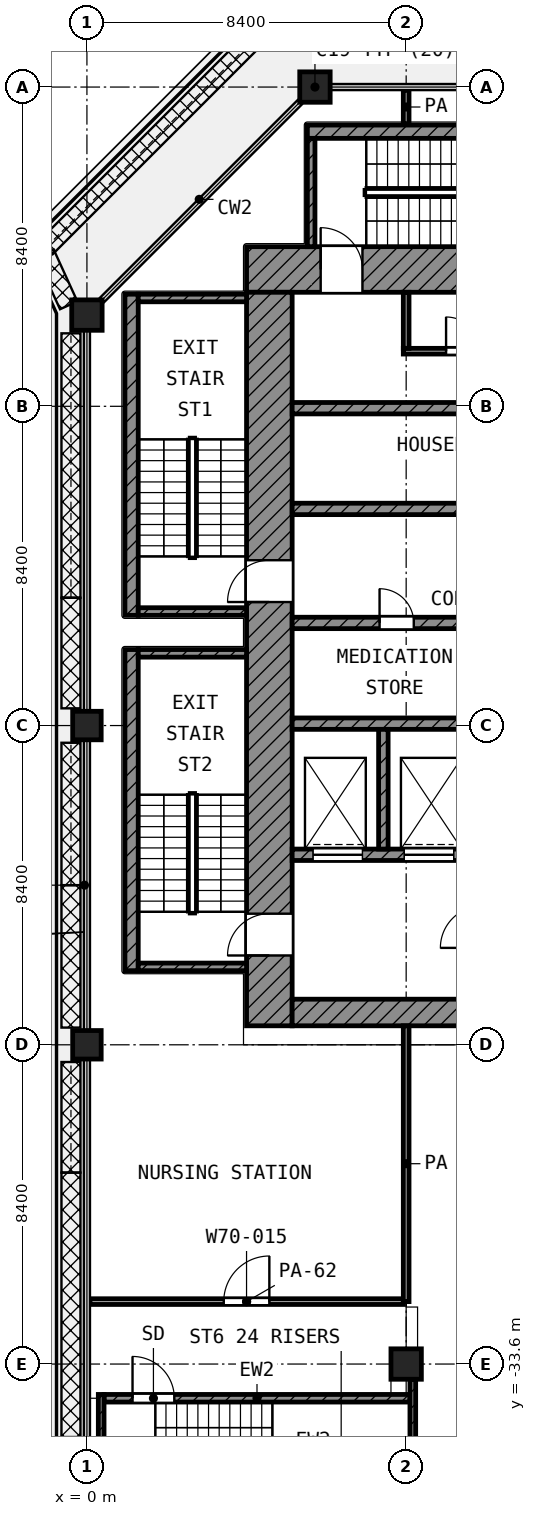
"""IFC4 building model, lengths in metres.
Left out: names, types, materials, properties, quantities, classifications, styles, units other than length and angle.
Written with IfcOpenShell. Run it as: python <this file> out.ifc"""

import sys

from ifc_helpers import new_model, si_unit, direction, frame, frame_2d, origin, origin_2d, place, context, subcontext, project, spatial, rectangle, extrude, element, fill, save


model = new_model("IFC4")
c1 = context("Model", 3, precision=1e-05, world=origin(), true_north=direction((0.0, 1.0)))
c2 = subcontext(c1, "Body", "Model", "MODEL_VIEW")
j1 = project(units=[si_unit("LENGTHUNIT", "METRE"), si_unit("PLANEANGLEUNIT", "RADIAN")], contexts=[c1])
p1 = place(None, origin())
s1 = spatial("IfcSite", under=j1, at=p1, CompositionType="ELEMENT")
p2 = place(p1, origin())
s2 = spatial("IfcBuilding", under=s1, at=p2, CompositionType="ELEMENT")
p3 = place(p2, frame((0.0, 0.0, 323.8)))
s3 = spatial("IfcBuildingStorey", under=s2, at=p3, CompositionType="ELEMENT", Elevation=323.8)
for number, where, z_axis, x_axis in (
    (1, (6.0, 0.0, 0.0), (0.0, 0.0, 1.0), (1.0, 0.0, 0.0)),
    (2, (0.0, -6.0, 0.0), (0.0, 0.0, 1.0), (1.0, 0.0, 0.0)),
):
    element("IfcColumn", number, at=place(p3, frame(where, z_axis=z_axis, x_axis=x_axis)), inside=s3, PredefinedType="COLUMN", context=c2, shape_type="SweptSolid", body=[
        extrude(rectangle(XDim=0.8, YDim=0.8, at=origin_2d()), origin(), (0.0, 0.0, 1.0), 4.2),
    ])
for number, where, z_axis, x_axis in (
    (3, (0.0, -16.8, 0.0), (0.0, 0.0, 1.0), (1.0, 0.0, 0.0)),
    (4, (0.0, -25.2, 0.0), (0.0, 0.0, 1.0), (1.0, 0.0, 0.0)),
):
    element("IfcColumn", number, at=place(p3, frame(where, z_axis=z_axis, x_axis=x_axis)), inside=s3, PredefinedType="COLUMN", context=c2, shape_type="SweptSolid", body=[
        extrude(rectangle(XDim=0.75, YDim=0.75, at=origin_2d()), origin(), (0.0, 0.0, 1.0), 4.2),
    ])
p4 = place(p3, frame((8.4, -33.6, 0.0), z_axis=(0.0, 0.0, 1.0), x_axis=(1.0, 0.0, 0.0)))
e5 = element("IfcColumn", 5, at=p4, inside=s3, PredefinedType="COLUMN", context=c2, shape_type="SweptSolid", body=[
    extrude(rectangle(XDim=0.8, YDim=0.8, at=origin_2d()), origin(), (0.0, 0.0, 1.0), 4.2),
])
p5 = place(p3, frame((4.2, -4.8, 0.0), z_axis=(0.0, 0.0, 1.0), x_axis=(1.0, 0.0, 0.0)))
e6 = element("IfcWall", 6, at=p5, inside=s3, PredefinedType="SHEAR", context=c2, shape_type="SweptSolid", body=[
    extrude(rectangle(XDim=20.5, YDim=1.2, at=frame_2d((10.25, 0.0))), origin(), (0.0, 0.0, 1.0), 3.6),
])
p6 = place(p5, frame((1.95, 0.0, 0.0)))
e7 = element("IfcOpeningElement", 7, at=p6, cuts=e6, PredefinedType="OPENING", context=c2, shape_type="SweptSolid", body=[
    extrude(rectangle(XDim=1.1, YDim=2.1, at=frame_2d((0.55, 1.05))), frame((0.0, 0.61, 0.0), z_axis=(0.0, -1.0, 0.0), x_axis=(1.0, 0.0, 0.0)), (0.0, 0.0, 1.0), 1.22),
])
p7 = place(p5, frame((17.95, 0.0, 0.0)))
e8 = element("IfcOpeningElement", 8, at=p7, cuts=e6, PredefinedType="OPENING", context=c2, shape_type="SweptSolid", body=[
    extrude(rectangle(XDim=1.1, YDim=2.1, at=frame_2d((0.55, 1.05))), frame((0.0, 0.61, 0.0), z_axis=(0.0, -1.0, 0.0), x_axis=(1.0, 0.0, 0.0)), (0.0, 0.0, 1.0), 1.22),
])
p8 = place(p3, frame((4.8, -24.7, 0.0), z_axis=(0.0, 0.0, 1.0), x_axis=(0.0, 1.0, 0.0)))
e9 = element("IfcWall", 9, at=p8, inside=s3, PredefinedType="SHEAR", context=c2, shape_type="SweptSolid", body=[
    extrude(rectangle(XDim=19.3, YDim=1.2, at=frame_2d((9.65, 0.0))), origin(), (0.0, 0.0, 1.0), 3.6),
])
p9 = place(p8, frame((11.15, 0.0, 0.0)))
e10 = element("IfcOpeningElement", 10, at=p9, cuts=e9, PredefinedType="OPENING", context=c2, shape_type="SweptSolid", body=[
    extrude(rectangle(XDim=1.1, YDim=2.1, at=frame_2d((0.55, 1.05))), frame((0.0, 0.61, 0.0), z_axis=(0.0, -1.0, 0.0), x_axis=(1.0, 0.0, 0.0)), (0.0, 0.0, 1.0), 1.22),
])
p10 = place(p8, frame((1.85, 0.0, 0.0)))
e11 = element("IfcOpeningElement", 11, at=p10, cuts=e9, PredefinedType="OPENING", context=c2, shape_type="SweptSolid", body=[
    extrude(rectangle(XDim=1.1, YDim=2.1, at=frame_2d((0.55, 1.05))), frame((0.0, 0.61, 0.0), z_axis=(0.0, -1.0, 0.0), x_axis=(1.0, 0.0, 0.0)), (0.0, 0.0, 1.0), 1.22),
])
p11 = place(p3, frame((5.4, -24.35, 0.0), z_axis=(0.0, 0.0, 1.0), x_axis=(1.0, 0.0, 0.0)))
e12 = element("IfcWall", 12, at=p11, inside=s3, PredefinedType="SHEAR", context=c2, shape_type="SweptSolid", body=[
    extrude(rectangle(XDim=18.6, YDim=0.7, at=frame_2d((9.3, 0.0))), origin(), (0.0, 0.0, 1.0), 3.6),
])
p12 = place(p11, frame((6.3, 0.0, 0.0)))
e13 = element("IfcOpeningElement", 13, at=p12, cuts=e12, PredefinedType="OPENING", context=c2, shape_type="SweptSolid", body=[
    extrude(rectangle(XDim=1.8, YDim=2.1, at=frame_2d((0.9, 1.05))), frame((0.0, 0.36, 0.0), z_axis=(0.0, -1.0, 0.0), x_axis=(1.0, 0.0, 0.0)), (0.0, 0.0, 1.0), 0.72),
])
p13 = place(p3, frame((5.4, -8.45, 0.0), z_axis=(0.0, 0.0, 1.0), x_axis=(1.0, 0.0, 0.0)))
e14 = element("IfcWall", 14, at=p13, inside=s3, PredefinedType="SHEAR", context=c2, shape_type="SweptSolid", body=[
    extrude(rectangle(XDim=16.65, YDim=0.3, at=frame_2d((8.325, 0.0))), origin(), (0.0, 0.0, 1.0), 3.6),
])
p14 = place(p3, frame((5.4, -11.1, 0.0), z_axis=(0.0, 0.0, 1.0), x_axis=(1.0, 0.0, 0.0)))
e15 = element("IfcWall", 15, at=p14, inside=s3, PredefinedType="SHEAR", context=c2, shape_type="SweptSolid", body=[
    extrude(rectangle(XDim=16.65, YDim=0.3, at=frame_2d((8.325, 0.0))), origin(), (0.0, 0.0, 1.0), 3.6),
])
p15 = place(p14, frame((5.05, 0.0, 0.0)))
e16 = element("IfcOpeningElement", 16, at=p15, cuts=e15, PredefinedType="OPENING", context=c2, shape_type="SweptSolid", body=[
    extrude(rectangle(XDim=0.9, YDim=2.1, at=frame_2d((0.45, 1.05))), frame((0.0, 0.16, 0.0), z_axis=(0.0, -1.0, 0.0), x_axis=(1.0, 0.0, 0.0)), (0.0, 0.0, 1.0), 0.32),
])
p16 = place(p14, frame((13.3, 0.0, 0.0)))
e17 = element("IfcOpeningElement", 17, at=p16, cuts=e15, PredefinedType="OPENING", context=c2, shape_type="SweptSolid", body=[
    extrude(rectangle(XDim=0.9, YDim=2.1, at=frame_2d((0.45, 1.05))), frame((0.0, 0.16, 0.0), z_axis=(0.0, -1.0, 0.0), x_axis=(1.0, 0.0, 0.0)), (0.0, 0.0, 1.0), 0.32),
])
p17 = place(p3, frame((5.4, -14.1, 0.0), z_axis=(0.0, 0.0, 1.0), x_axis=(1.0, 0.0, 0.0)))
e18 = element("IfcWall", 18, at=p17, inside=s3, PredefinedType="SHEAR", context=c2, shape_type="SweptSolid", body=[
    extrude(rectangle(XDim=16.65, YDim=0.3, at=frame_2d((8.325, 0.0))), origin(), (0.0, 0.0, 1.0), 3.6),
])
p18 = place(p17, frame((6.325, 0.0, 0.0)))
e19 = element("IfcOpeningElement", 19, at=p18, cuts=e18, PredefinedType="OPENING", context=c2, shape_type="SweptSolid", body=[
    extrude(rectangle(XDim=1.1, YDim=2.1, at=frame_2d((0.55, 1.05))), frame((0.0, 0.16, 0.0), z_axis=(0.0, -1.0, 0.0), x_axis=(1.0, 0.0, 0.0)), (0.0, 0.0, 1.0), 0.32),
])
p19 = place(p17, frame((9.075, 0.0, 0.0)))
e20 = element("IfcOpeningElement", 20, at=p19, cuts=e18, PredefinedType="OPENING", context=c2, shape_type="SweptSolid", body=[
    extrude(rectangle(XDim=1.1, YDim=2.1, at=frame_2d((0.55, 1.05))), frame((0.0, 0.16, 0.0), z_axis=(0.0, -1.0, 0.0), x_axis=(1.0, 0.0, 0.0)), (0.0, 0.0, 1.0), 0.32),
])
p20 = place(p17, frame((11.825, 0.0, 0.0)))
e21 = element("IfcOpeningElement", 21, at=p20, cuts=e18, PredefinedType="OPENING", context=c2, shape_type="SweptSolid", body=[
    extrude(rectangle(XDim=1.1, YDim=2.1, at=frame_2d((0.55, 1.05))), frame((0.0, 0.16, 0.0), z_axis=(0.0, -1.0, 0.0), x_axis=(1.0, 0.0, 0.0)), (0.0, 0.0, 1.0), 0.32),
])
p21 = place(p17, frame((14.575, 0.0, 0.0)))
e22 = element("IfcOpeningElement", 22, at=p21, cuts=e18, PredefinedType="OPENING", context=c2, shape_type="SweptSolid", body=[
    extrude(rectangle(XDim=1.1, YDim=2.1, at=frame_2d((0.55, 1.05))), frame((0.0, 0.16, 0.0), z_axis=(0.0, -1.0, 0.0), x_axis=(1.0, 0.0, 0.0)), (0.0, 0.0, 1.0), 0.32),
])
p22 = place(p17, frame((2.3, 0.0, 0.0)))
e23 = element("IfcOpeningElement", 23, at=p22, cuts=e18, PredefinedType="OPENING", context=c2, shape_type="SweptSolid", body=[
    extrude(rectangle(XDim=0.9, YDim=2.1, at=frame_2d((0.45, 1.05))), frame((0.0, 0.16, 0.0), z_axis=(0.0, -1.0, 0.0), x_axis=(1.0, 0.0, 0.0)), (0.0, 0.0, 1.0), 0.32),
])
p23 = place(p3, frame((5.4, -16.75, 0.0), z_axis=(0.0, 0.0, 1.0), x_axis=(1.0, 0.0, 0.0)))
e24 = element("IfcWall", 24, at=p23, inside=s3, PredefinedType="SHEAR", context=c2, shape_type="SweptSolid", body=[
    extrude(rectangle(XDim=16.65, YDim=0.3, at=frame_2d((8.325, 0.0))), origin(), (0.0, 0.0, 1.0), 3.6),
])
p24 = place(p3, frame((5.4, -20.2, 0.0), z_axis=(0.0, 0.0, 1.0), x_axis=(1.0, 0.0, 0.0)))
e25 = element("IfcWall", 25, at=p24, inside=s3, PredefinedType="SHEAR", context=c2, shape_type="SweptSolid", body=[
    extrude(rectangle(XDim=14.65, YDim=0.3, at=frame_2d((7.325, 0.0))), origin(), (0.0, 0.0, 1.0), 3.6),
])
p25 = place(p24, frame((10.55, 0.0, 0.0)))
e26 = element("IfcOpeningElement", 26, at=p25, cuts=e25, PredefinedType="OPENING", context=c2, shape_type="SweptSolid", body=[
    extrude(rectangle(XDim=1.3, YDim=2.1, at=frame_2d((0.65, 1.05))), frame((0.0, 0.16, 0.0), z_axis=(0.0, -1.0, 0.0), x_axis=(1.0, 0.0, 0.0)), (0.0, 0.0, 1.0), 0.32),
])
p26 = place(p24, frame((12.95, 0.0, 0.0)))
e27 = element("IfcOpeningElement", 27, at=p26, cuts=e25, PredefinedType="OPENING", context=c2, shape_type="SweptSolid", body=[
    extrude(rectangle(XDim=1.3, YDim=2.1, at=frame_2d((0.65, 1.05))), frame((0.0, 0.16, 0.0), z_axis=(0.0, -1.0, 0.0), x_axis=(1.0, 0.0, 0.0)), (0.0, 0.0, 1.0), 0.32),
])
p27 = place(p24, frame((0.55, 0.0, 0.0)))
e28 = element("IfcOpeningElement", 28, at=p27, cuts=e25, PredefinedType="OPENING", context=c2, shape_type="SweptSolid", body=[
    extrude(rectangle(XDim=1.3, YDim=2.1, at=frame_2d((0.65, 1.05))), frame((0.0, 0.16, 0.0), z_axis=(0.0, -1.0, 0.0), x_axis=(1.0, 0.0, 0.0)), (0.0, 0.0, 1.0), 0.32),
])
p28 = place(p24, frame((2.95, 0.0, 0.0)))
e29 = element("IfcOpeningElement", 29, at=p28, cuts=e25, PredefinedType="OPENING", context=c2, shape_type="SweptSolid", body=[
    extrude(rectangle(XDim=1.3, YDim=2.1, at=frame_2d((0.65, 1.05))), frame((0.0, 0.16, 0.0), z_axis=(0.0, -1.0, 0.0), x_axis=(1.0, 0.0, 0.0)), (0.0, 0.0, 1.0), 0.32),
])
p29 = place(p24, frame((5.95, 0.0, 0.0)))
e30 = element("IfcOpeningElement", 30, at=p29, cuts=e25, PredefinedType="OPENING", context=c2, shape_type="SweptSolid", body=[
    extrude(rectangle(XDim=0.9, YDim=2.1, at=frame_2d((0.45, 1.05))), frame((0.0, 0.16, 0.0), z_axis=(0.0, -1.0, 0.0), x_axis=(1.0, 0.0, 0.0)), (0.0, 0.0, 1.0), 0.32),
])
p30 = place(p24, frame((8.35, 0.0, 0.0)))
e31 = element("IfcOpeningElement", 31, at=p30, cuts=e25, PredefinedType="OPENING", context=c2, shape_type="SweptSolid", body=[
    extrude(rectangle(XDim=0.9, YDim=2.1, at=frame_2d((0.45, 1.05))), frame((0.0, 0.16, 0.0), z_axis=(0.0, -1.0, 0.0), x_axis=(1.0, 0.0, 0.0)), (0.0, 0.0, 1.0), 0.32),
])
p31 = place(p3, frame((7.8, -20.05, 0.0), z_axis=(0.0, 0.0, 1.0), x_axis=(0.0, 1.0, 0.0)))
e32 = element("IfcWall", 32, at=p31, inside=s3, PredefinedType="SHEAR", context=c2, shape_type="SweptSolid", body=[
    extrude(rectangle(XDim=3.15, YDim=0.25, at=frame_2d((1.575, 0.0))), origin(), (0.0, 0.0, 1.0), 3.6),
])
p32 = place(p3, frame((8.325, -6.95, 0.0), z_axis=(0.0, 0.0, 1.0), x_axis=(1.0, 0.0, 0.0)))
e33 = element("IfcWall", 33, at=p32, inside=s3, PredefinedType="PARTITIONING", context=c2, shape_type="SweptSolid", body=[
    extrude(rectangle(XDim=12.75, YDim=0.15, at=frame_2d((6.375, 0.0))), origin(), (0.0, 0.0, 1.0), 3.6),
])
p33 = place(p32, frame((1.125, 0.0, 0.0)))
e34 = element("IfcOpeningElement", 34, at=p33, cuts=e33, PredefinedType="OPENING", context=c2, shape_type="SweptSolid", body=[
    extrude(rectangle(XDim=0.9, YDim=2.1, at=frame_2d((0.45, 1.05))), frame((0.0, 0.085, 0.0), z_axis=(0.0, -1.0, 0.0), x_axis=(1.0, 0.0, 0.0)), (0.0, 0.0, 1.0), 0.17),
])
p34 = place(p32, frame((3.225, 0.0, 0.0)))
e35 = element("IfcOpeningElement", 35, at=p34, cuts=e33, PredefinedType="OPENING", context=c2, shape_type="SweptSolid", body=[
    extrude(rectangle(XDim=0.9, YDim=2.1, at=frame_2d((0.45, 1.05))), frame((0.0, 0.085, 0.0), z_axis=(0.0, -1.0, 0.0), x_axis=(1.0, 0.0, 0.0)), (0.0, 0.0, 1.0), 0.17),
])
p35 = place(p32, frame((5.025, 0.0, 0.0)))
e36 = element("IfcOpeningElement", 36, at=p35, cuts=e33, PredefinedType="OPENING", context=c2, shape_type="SweptSolid", body=[
    extrude(rectangle(XDim=0.9, YDim=2.1, at=frame_2d((0.45, 1.05))), frame((0.0, 0.085, 0.0), z_axis=(0.0, -1.0, 0.0), x_axis=(1.0, 0.0, 0.0)), (0.0, 0.0, 1.0), 0.17),
])
p36 = place(p32, frame((7.425, 0.0, 0.0)))
e37 = element("IfcOpeningElement", 37, at=p36, cuts=e33, PredefinedType="OPENING", context=c2, shape_type="SweptSolid", body=[
    extrude(rectangle(XDim=0.9, YDim=2.1, at=frame_2d((0.45, 1.05))), frame((0.0, 0.085, 0.0), z_axis=(0.0, -1.0, 0.0), x_axis=(1.0, 0.0, 0.0)), (0.0, 0.0, 1.0), 0.17),
])
p37 = place(p32, frame((9.525, 0.0, 0.0)))
e38 = element("IfcOpeningElement", 38, at=p37, cuts=e33, PredefinedType="OPENING", context=c2, shape_type="SweptSolid", body=[
    extrude(rectangle(XDim=0.9, YDim=2.1, at=frame_2d((0.45, 1.05))), frame((0.0, 0.085, 0.0), z_axis=(0.0, -1.0, 0.0), x_axis=(1.0, 0.0, 0.0)), (0.0, 0.0, 1.0), 0.17),
])
p38 = place(p32, frame((11.325, 0.0, 0.0)))
e39 = element("IfcOpeningElement", 39, at=p38, cuts=e33, PredefinedType="OPENING", context=c2, shape_type="SweptSolid", body=[
    extrude(rectangle(XDim=0.9, YDim=2.1, at=frame_2d((0.45, 1.05))), frame((0.0, 0.085, 0.0), z_axis=(0.0, -1.0, 0.0), x_axis=(1.0, 0.0, 0.0)), (0.0, 0.0, 1.0), 0.17),
])
p39 = place(p3, frame((8.4, -6.875, 0.0), z_axis=(0.0, 0.0, 1.0), x_axis=(0.0, 1.0, 0.0)))
e40 = element("IfcWall", 40, at=p39, inside=s3, PredefinedType="PARTITIONING", context=c2, shape_type="SweptSolid", body=[
    extrude(rectangle(XDim=1.475, YDim=0.15, at=frame_2d((0.738, 0.0))), origin(), (0.0, 0.0, 1.0), 3.6),
])
p40 = place(p3, frame((1.175, -13.9, 0.0), z_axis=(0.0, 0.0, 1.0), x_axis=(0.0, 1.0, 0.0)))
e41 = element("IfcWall", 41, at=p40, inside=s3, PredefinedType="SHEAR", context=c2, shape_type="SweptSolid", body=[
    extrude(rectangle(XDim=8.45, YDim=0.35, at=frame_2d((4.225, 0.0))), origin(), (0.0, 0.0, 1.0), 3.6),
])
for number, where, z_axis, x_axis in (
    (42, (1.35, -5.55, 0.0), (0.0, 0.0, 1.0), (1.0, 0.0, 0.0)),
    (43, (1.35, -13.8, 0.0), (0.0, 0.0, 1.0), (1.0, 0.0, 0.0)),
):
    element("IfcWall", number, at=place(p3, frame(where, z_axis=z_axis, x_axis=x_axis)), inside=s3, PredefinedType="SHEAR", context=c2, shape_type="SweptSolid", body=[
        extrude(rectangle(XDim=2.85, YDim=0.2, at=frame_2d((1.425, 0.0))), origin(), (0.0, 0.0, 1.0), 3.6),
    ])
p41 = place(p3, frame((1.175, -23.25, 0.0), z_axis=(0.0, 0.0, 1.0), x_axis=(0.0, 1.0, 0.0)))
e44 = element("IfcWall", 44, at=p41, inside=s3, PredefinedType="SHEAR", context=c2, shape_type="SweptSolid", body=[
    extrude(rectangle(XDim=8.45, YDim=0.35, at=frame_2d((4.225, 0.0))), origin(), (0.0, 0.0, 1.0), 3.6),
])
for number, where, z_axis, x_axis in (
    (45, (1.35, -14.9, 0.0), (0.0, 0.0, 1.0), (1.0, 0.0, 0.0)),
    (46, (1.35, -23.15, 0.0), (0.0, 0.0, 1.0), (1.0, 0.0, 0.0)),
):
    element("IfcWall", number, at=place(p3, frame(where, z_axis=z_axis, x_axis=x_axis)), inside=s3, PredefinedType="SHEAR", context=c2, shape_type="SweptSolid", body=[
        extrude(rectangle(XDim=2.85, YDim=0.2, at=frame_2d((1.425, 0.0))), origin(), (0.0, 0.0, 1.0), 3.6),
    ])
p42 = place(p3, frame((5.8, -1.175, 0.0), z_axis=(0.0, 0.0, 1.0), x_axis=(1.0, 0.0, 0.0)))
e47 = element("IfcWall", 47, at=p42, inside=s3, PredefinedType="SHEAR", context=c2, shape_type="SweptSolid", body=[
    extrude(rectangle(XDim=8.45, YDim=0.35, at=frame_2d((4.225, 0.0))), origin(), (0.0, 0.0, 1.0), 3.6),
])
p43 = place(p3, frame((5.9, -4.2, 0.0), z_axis=(0.0, 0.0, 1.0), x_axis=(0.0, 1.0, 0.0)))
e48 = element("IfcWall", 48, at=p43, inside=s3, PredefinedType="SHEAR", context=c2, shape_type="SweptSolid", body=[
    extrude(rectangle(XDim=2.85, YDim=0.2, at=frame_2d((1.425, 0.0))), origin(), (0.0, 0.0, 1.0), 3.6),
])
p44 = place(p3, frame((0.375, -40.05, 0.0), z_axis=(0.0, 0.0, 1.0), x_axis=(0.0, 1.0, 0.0)))
e49 = element("IfcWall", 49, at=p44, inside=s3, PredefinedType="SHEAR", context=c2, shape_type="SweptSolid", body=[
    extrude(rectangle(XDim=5.65, YDim=0.15, at=frame_2d((2.825, 0.0))), origin(), (0.0, 0.0, 1.0), 3.6),
])
p45 = place(p3, frame((8.575, -40.05, 0.0), z_axis=(0.0, 0.0, 1.0), x_axis=(0.0, 1.0, 0.0)))
e50 = element("IfcWall", 50, at=p45, inside=s3, PredefinedType="SHEAR", context=c2, shape_type="SweptSolid", body=[
    extrude(rectangle(XDim=6.05, YDim=0.15, at=frame_2d((3.025, 0.0))), origin(), (0.0, 0.0, 1.0), 3.6),
])
p46 = place(p3, frame((0.45, -34.5, 0.0), z_axis=(0.0, 0.0, 1.0), x_axis=(1.0, 0.0, 0.0)))
e51 = element("IfcWall", 51, at=p46, inside=s3, PredefinedType="SHEAR", context=c2, shape_type="SweptSolid", body=[
    extrude(rectangle(XDim=8.05, YDim=0.2, at=frame_2d((4.025, 0.0))), origin(), (0.0, 0.0, 1.0), 3.6),
])
p47 = place(p46, frame((0.75, 0.0, 0.0)))
e52 = element("IfcOpeningElement", 52, at=p47, cuts=e51, PredefinedType="OPENING", context=c2, shape_type="SweptSolid", body=[
    extrude(rectangle(XDim=1.1, YDim=2.1, at=frame_2d((0.55, 1.05))), frame((0.0, 0.11, 0.0), z_axis=(0.0, -1.0, 0.0), x_axis=(1.0, 0.0, 0.0)), (0.0, 0.0, 1.0), 0.22),
])
p48 = place(p3, frame((0.08, -31.957, 0.0), z_axis=(0.0, 0.0, 1.0), x_axis=(1.0, 0.0, 0.0)))
e53 = element("IfcWall", 53, at=p48, inside=s3, PredefinedType="PARTITIONING", context=c2, shape_type="SweptSolid", body=[
    extrude(rectangle(XDim=8.245, YDim=0.15, at=frame_2d((4.123, 0.0))), origin(), (0.0, 0.0, 1.0), 2.7),
])
p49 = place(p48, frame((3.52, 0.0, 0.0)))
e54 = element("IfcOpeningElement", 54, at=p49, cuts=e53, PredefinedType="OPENING", context=c2, shape_type="SweptSolid", body=[
    extrude(rectangle(XDim=1.2, YDim=2.1, at=frame_2d((0.6, 1.05))), frame((0.0, 0.085, 0.0), z_axis=(0.0, -1.0, 0.0), x_axis=(1.0, 0.0, 0.0)), (0.0, 0.0, 1.0), 0.17),
])
p50 = place(p3, frame((8.4, -31.957, 0.0), z_axis=(0.0, 0.0, 1.0), x_axis=(0.0, 1.0, 0.0)))
e55 = element("IfcWall", 55, at=p50, inside=s3, PredefinedType="PARTITIONING", context=c2, shape_type="SweptSolid", body=[
    extrude(rectangle(XDim=7.257, YDim=0.15, at=frame_2d((3.628, 0.0))), origin(), (0.0, 0.0, 1.0), 3.6),
])
p51 = place(p3, frame((8.4, -0.97, 0.0), z_axis=(0.0, 0.0, 1.0), x_axis=(0.0, 1.0, 0.0)))
e56 = element("IfcWall", 56, at=p51, inside=s3, PredefinedType="PARTITIONING", context=c2, shape_type="SweptSolid", body=[
    extrude(rectangle(XDim=0.89, YDim=0.15, at=frame_2d((0.445, 0.0))), origin(), (0.0, 0.0, 1.0), 3.6),
])
p52 = place(p27, origin())
e57 = element("IfcDoor", 57, at=p52, inside=s3, OperationType="DOUBLE_DOOR_SLIDING", PredefinedType="DOOR", context=c2, shape_type="SweptSolid", body=[
    extrude(rectangle(XDim=1.3, YDim=2.1, at=frame_2d((0.65, 1.05))), frame((0.0, 0.025, 0.0), z_axis=(0.0, -1.0, 0.0), x_axis=(1.0, 0.0, 0.0)), (0.0, 0.0, 1.0), 0.05),
])
fill(e28, e57)
p53 = place(p28, origin())
e58 = element("IfcDoor", 58, at=p53, inside=s3, OperationType="DOUBLE_DOOR_SLIDING", PredefinedType="DOOR", context=c2, shape_type="SweptSolid", body=[
    extrude(rectangle(XDim=1.3, YDim=2.1, at=frame_2d((0.65, 1.05))), frame((0.0, 0.025, 0.0), z_axis=(0.0, -1.0, 0.0), x_axis=(1.0, 0.0, 0.0)), (0.0, 0.0, 1.0), 0.05),
])
fill(e29, e58)
p54 = place(p9, origin())
e59 = element("IfcDoor", 59, at=p54, inside=s3, OperationType="SINGLE_SWING_LEFT", PredefinedType="DOOR", context=c2, shape_type="SweptSolid", body=[
    extrude(rectangle(XDim=1.1, YDim=2.1, at=frame_2d((0.55, 1.05))), frame((0.0, 0.025, 0.0), z_axis=(0.0, -1.0, 0.0), x_axis=(1.0, 0.0, 0.0)), (0.0, 0.0, 1.0), 0.05),
])
fill(e10, e59)
p55 = place(p10, origin())
e60 = element("IfcDoor", 60, at=p55, inside=s3, OperationType="SINGLE_SWING_LEFT", PredefinedType="DOOR", context=c2, shape_type="SweptSolid", body=[
    extrude(rectangle(XDim=1.1, YDim=2.1, at=frame_2d((0.55, 1.05))), frame((0.0, 0.025, 0.0), z_axis=(0.0, -1.0, 0.0), x_axis=(1.0, 0.0, 0.0)), (0.0, 0.0, 1.0), 0.05),
])
fill(e11, e60)
p56 = place(p6, origin())
e61 = element("IfcDoor", 61, at=p56, inside=s3, OperationType="SINGLE_SWING_LEFT", PredefinedType="DOOR", context=c2, shape_type="SweptSolid", body=[
    extrude(rectangle(XDim=1.1, YDim=2.1, at=frame_2d((0.55, 1.05))), frame((0.0, 0.025, 0.0), z_axis=(0.0, -1.0, 0.0), x_axis=(1.0, 0.0, 0.0)), (0.0, 0.0, 1.0), 0.05),
])
fill(e7, e61)
p57 = place(p33, origin())
e62 = element("IfcDoor", 62, at=p57, inside=s3, OperationType="SINGLE_SWING_LEFT", PredefinedType="DOOR", context=c2, shape_type="SweptSolid", body=[
    extrude(rectangle(XDim=0.9, YDim=2.1, at=frame_2d((0.45, 1.05))), frame((0.0, 0.025, 0.0), z_axis=(0.0, -1.0, 0.0), x_axis=(1.0, 0.0, 0.0)), (0.0, 0.0, 1.0), 0.05),
])
fill(e34, e62)
p58 = place(p22, origin())
e63 = element("IfcDoor", 63, at=p58, inside=s3, OperationType="SINGLE_SWING_LEFT", PredefinedType="DOOR", context=c2, shape_type="SweptSolid", body=[
    extrude(rectangle(XDim=0.9, YDim=2.1, at=frame_2d((0.45, 1.05))), frame((0.0, 0.025, 0.0), z_axis=(0.0, -1.0, 0.0), x_axis=(1.0, 0.0, 0.0)), (0.0, 0.0, 1.0), 0.05),
])
fill(e23, e63)
p59 = place(p47, origin())
e64 = element("IfcDoor", 64, at=p59, inside=s3, OperationType="SINGLE_SWING_LEFT", PredefinedType="DOOR", context=c2, shape_type="SweptSolid", body=[
    extrude(rectangle(XDim=1.1, YDim=2.1, at=frame_2d((0.55, 1.05))), frame((0.0, 0.025, 0.0), z_axis=(0.0, -1.0, 0.0), x_axis=(1.0, 0.0, 0.0)), (0.0, 0.0, 1.0), 0.05),
])
fill(e52, e64)
p60 = place(p49, origin())
e65 = element("IfcDoor", 65, at=p60, inside=s3, OperationType="SINGLE_SWING_RIGHT", PredefinedType="DOOR", context=c2, shape_type="SweptSolid", body=[
    extrude(rectangle(XDim=1.2, YDim=2.1, at=frame_2d((0.6, 1.05))), frame((0.0, 0.025, 0.0), z_axis=(0.0, -1.0, 0.0), x_axis=(1.0, 0.0, 0.0)), (0.0, 0.0, 1.0), 0.05),
])
fill(e54, e65)
save(model, sys.argv[1])
